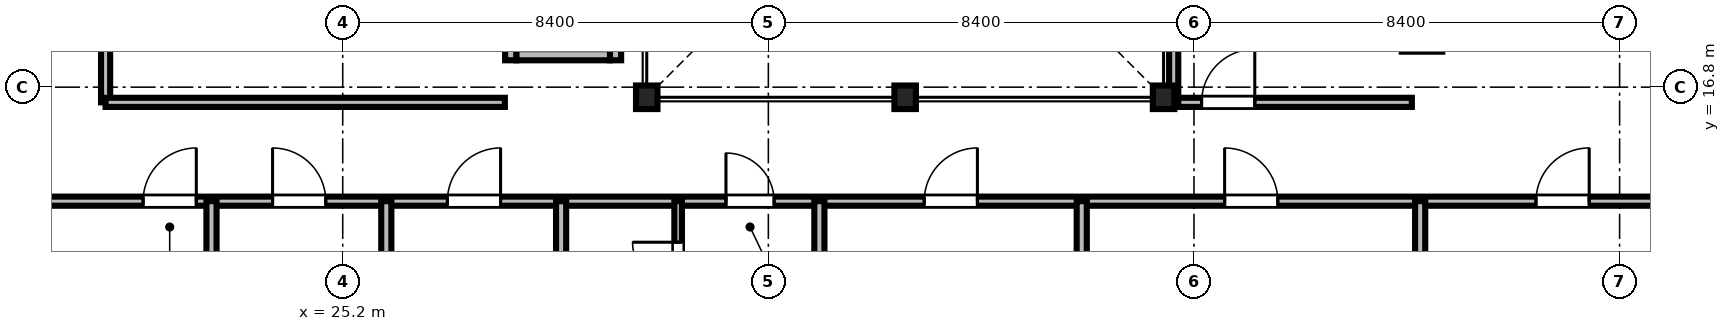
"""IFC4 building model, lengths in metres.
Left out: names, types, materials, properties, quantities, classifications, styles, units other than length and angle.
Written with IfcOpenShell. Run it as: python <this file> out.ifc"""

import sys

from ifc_helpers import new_model, si_unit, direction, frame, frame_2d, origin, origin_2d, place, context, subcontext, project, spatial, rectangle, i_section, extrude, source, transform, mapped, element, fill, save


model = new_model("IFC4")
c1 = context("Model", 3, precision=1e-05, world=origin(), true_north=direction((0.0, 1.0)))
c2 = subcontext(c1, "Body", "Model", "MODEL_VIEW")
j1 = project(units=[si_unit("LENGTHUNIT", "METRE"), si_unit("PLANEANGLEUNIT", "RADIAN")], contexts=[c1])
p1 = place(None, origin())
s1 = spatial("IfcSite", under=j1, at=p1, CompositionType="ELEMENT")
p2 = place(p1, origin())
s2 = spatial("IfcBuilding", under=s1, at=p2, CompositionType="ELEMENT")
p3 = place(p2, frame((0.0, 0.0, 107.5)))
s3 = spatial("IfcBuildingStorey", under=s2, at=p3, CompositionType="ELEMENT", Elevation=107.5)
m1 = source(origin(), c2, "Body", "SweptSolid", [
    extrude(i_section(OverallWidth=0.424, OverallDepth=0.465, WebThickness=0.035, FlangeThickness=0.056, FilletRadius=0.015, at=origin_2d()), origin(), (0.0, 0.0, 1.0), 3.56),
])
for number, where, z_axis, x_axis in (
    (1, (31.2, 16.6, 0.0), (0.0, 0.0, 1.0), (1.0, 0.0, 0.0)),
    (2, (36.3, 16.6, 0.0), (0.0, 0.0, 1.0), (1.0, 0.0, 0.0)),
    (3, (41.4, 16.6, 0.0), (0.0, 0.0, 1.0), (1.0, 0.0, 0.0)),
):
    element("IfcColumn", number, at=place(p3, frame(where, z_axis=z_axis, x_axis=x_axis)), inside=s3, PredefinedType="COLUMN", context=c2, shape_type="MappedRepresentation", body=[
        mapped(m1, transform((0.0, 0.0, 0.0), scale=1.0)),
    ])
m2 = source(origin(), c2, "Body", "SweptSolid", [
    extrude(rectangle(XDim=1.85, YDim=0.22, at=frame_2d((0.925, 0.0))), origin(), (0.0, 0.0, 1.0), 3.56),
])
p4 = place(p3, frame((28.625, 17.44, 0.0), z_axis=(0.0, 0.0, 1.0), x_axis=(1.0, 0.0, 0.0)))
e4 = element("IfcWall", 4, at=p4, inside=s3, PredefinedType="SOLIDWALL", context=c2, shape_type="MappedRepresentation", body=[
    mapped(m2, transform((0.0, 0.0, 0.0), scale=1.0)),
])
m3 = source(origin(), c2, "Body", "SweptSolid", [
    extrude(rectangle(XDim=2.54, YDim=0.22, at=frame_2d((1.27, 0.0))), origin(), (0.0, 0.0, 1.0), 3.56),
])
for number, where, z_axis, x_axis in (
    (5, (28.515, 17.33, 0.0), (0.0, 0.0, 1.0), (0.0, 1.0, 0.0)),
    (6, (30.585, 17.33, 0.0), (0.0, 0.0, 1.0), (0.0, 1.0, 0.0)),
):
    element("IfcWall", number, at=place(p3, frame(where, z_axis=z_axis, x_axis=x_axis)), inside=s3, PredefinedType="SOLIDWALL", context=c2, shape_type="MappedRepresentation", body=[
        mapped(m3, transform((0.0, 0.0, 0.0), scale=1.0)),
    ])
m4 = source(origin(), c2, "Body", "SweptSolid", [
    extrude(rectangle(XDim=46.156, YDim=0.18, at=frame_2d((23.078, 0.0))), origin(), (0.0, 0.0, 1.0), 2.802),
])
p5 = place(p3, frame((6.922, 14.55, 0.0), z_axis=(0.0, 0.0, 1.0), x_axis=(1.0, 0.0, 0.0)))
e7 = element("IfcWall", 7, at=p5, inside=s3, PredefinedType="PARTITIONING", context=c2, shape_type="MappedRepresentation", body=[
    mapped(m4, transform((0.0, 0.0, 0.0), scale=1.0)),
])
m5 = source(origin(), c2, "Body", "SweptSolid", [
    extrude(rectangle(XDim=1.05, YDim=2.2, at=frame_2d((0.525, 1.1))), frame((0.0, 0.1, 0.0), z_axis=(0.0, -1.0, 0.0), x_axis=(1.0, 0.0, 0.0)), (0.0, 0.0, 1.0), 0.2),
])
p6 = place(p5, frame((14.338, 0.0, 0.0)))
e8 = element("IfcOpeningElement", 8, at=p6, cuts=e7, PredefinedType="OPENING", context=c2, shape_type="MappedRepresentation", body=[
    mapped(m5, transform((0.0, 0.0, 0.0), scale=1.0)),
])
p7 = place(p5, frame((16.893, 0.0, 0.0)))
e9 = element("IfcOpeningElement", 9, at=p7, cuts=e7, PredefinedType="OPENING", context=c2, shape_type="MappedRepresentation", body=[
    mapped(m5, transform((0.0, 0.0, 0.0), scale=1.0)),
])
p8 = place(p5, frame((20.344, 0.0, 0.0)))
e10 = element("IfcOpeningElement", 10, at=p8, cuts=e7, PredefinedType="OPENING", context=c2, shape_type="MappedRepresentation", body=[
    mapped(m5, transform((0.0, 0.0, 0.0), scale=1.0)),
])
m6 = source(origin(), c2, "Body", "SweptSolid", [
    extrude(rectangle(XDim=0.95, YDim=2.15, at=frame_2d((0.475, 1.075))), frame((0.0, 0.1, 0.0), z_axis=(0.0, -1.0, 0.0), x_axis=(1.0, 0.0, 0.0)), (0.0, 0.0, 1.0), 0.2),
])
p9 = place(p5, frame((25.842, 0.0, 0.0)))
e11 = element("IfcOpeningElement", 11, at=p9, cuts=e7, PredefinedType="OPENING", context=c2, shape_type="MappedRepresentation", body=[
    mapped(m6, transform((0.0, 0.0, 0.0), scale=1.0)),
])
p10 = place(p5, frame((29.754, 0.0, 0.0)))
e12 = element("IfcOpeningElement", 12, at=p10, cuts=e7, PredefinedType="OPENING", context=c2, shape_type="MappedRepresentation", body=[
    mapped(m5, transform((0.0, 0.0, 0.0), scale=1.0)),
])
p11 = place(p5, frame((35.683, 0.0, 0.0)))
e13 = element("IfcOpeningElement", 13, at=p11, cuts=e7, PredefinedType="OPENING", context=c2, shape_type="MappedRepresentation", body=[
    mapped(m5, transform((0.0, 0.0, 0.0), scale=1.0)),
])
p12 = place(p5, frame((41.828, 0.0, 0.0)))
e14 = element("IfcOpeningElement", 14, at=p12, cuts=e7, PredefinedType="OPENING", context=c2, shape_type="MappedRepresentation", body=[
    mapped(m5, transform((0.0, 0.0, 0.0), scale=1.0)),
])
m7 = source(origin(), c2, "Body", "SweptSolid", [
    extrude(rectangle(XDim=11.94, YDim=0.18, at=frame_2d((5.97, 0.0))), origin(), (0.0, 0.0, 1.0), 2.952),
])
p13 = place(p3, frame((20.52, 16.5, 0.0), z_axis=(0.0, 0.0, 1.0), x_axis=(0.0, 1.0, 0.0)))
e15 = element("IfcWall", 15, at=p13, inside=s3, PredefinedType="PARTITIONING", context=c2, shape_type="MappedRepresentation", body=[
    mapped(m7, transform((0.0, 0.0, 0.0), scale=1.0)),
])
p14 = place(p13, frame((4.5, 0.0, 0.0)))
e16 = element("IfcOpeningElement", 16, at=p14, cuts=e15, PredefinedType="OPENING", context=c2, shape_type="MappedRepresentation", body=[
    mapped(m5, transform((0.0, 0.0, 0.0), scale=1.0)),
])
m8 = source(origin(), c2, "Body", "SweptSolid", [
    extrude(rectangle(XDim=4.7, YDim=0.18, at=frame_2d((2.35, 0.0))), origin(), (0.0, 0.0, 1.0), 2.952),
])
p15 = place(p3, frame((41.6, 16.5, 0.0), z_axis=(0.0, 0.0, 1.0), x_axis=(1.0, 0.0, 0.0)))
e17 = element("IfcWall", 17, at=p15, inside=s3, PredefinedType="PARTITIONING", context=c2, shape_type="MappedRepresentation", body=[
    mapped(m8, transform((0.0, 0.0, 0.0), scale=1.0)),
])
p16 = place(p15, frame((0.55, 0.0, 0.0)))
e18 = element("IfcOpeningElement", 18, at=p16, cuts=e17, PredefinedType="OPENING", context=c2, shape_type="MappedRepresentation", body=[
    mapped(m5, transform((0.0, 0.0, 0.0), scale=1.0)),
])
m9 = source(origin(), c2, "Body", "SweptSolid", [
    extrude(rectangle(XDim=2.36, YDim=0.15, at=frame_2d((1.18, 0.0))), origin(), (0.0, 0.0, 1.0), 3.56),
])
p17 = place(p3, frame((31.82, 12.19, 0.0), z_axis=(0.0, 0.0, 1.0), x_axis=(0.0, 1.0, 0.0)))
e19 = element("IfcWall", 19, at=p17, inside=s3, PredefinedType="PARTITIONING", context=c2, shape_type="MappedRepresentation", body=[
    mapped(m9, transform((0.0, 0.0, 0.0), scale=1.0)),
])
m10 = source(origin(), c2, "Body", "SweptSolid", [
    extrude(rectangle(XDim=0.9, YDim=2.1, at=frame_2d((0.45, 1.05))), frame((0.0, 0.085, 0.0), z_axis=(0.0, -1.0, 0.0), x_axis=(1.0, 0.0, 0.0)), (0.0, 0.0, 1.0), 0.17),
])
p18 = place(p17, frame((0.65, 0.0, 0.0)))
e20 = element("IfcOpeningElement", 20, at=p18, cuts=e19, PredefinedType="OPENING", context=c2, shape_type="MappedRepresentation", body=[
    mapped(m10, transform((0.0, 0.0, 0.0), scale=1.0)),
])
m11 = source(origin(), c2, "Body", "SweptSolid", [
    extrude(rectangle(XDim=12.428, YDim=0.2, at=frame_2d((6.214, 0.0))), origin(), (0.0, 0.0, 1.0), 2.802),
])
for number, where, z_axis, x_axis in (
    (21, (22.61, 2.122, 0.0), (0.0, 0.0, 1.0), (0.0, 1.0, 0.0)),
    (22, (26.06, 2.122, 0.0), (0.0, 0.0, 1.0), (0.0, 1.0, 0.0)),
):
    element("IfcWall", number, at=place(p3, frame(where, z_axis=z_axis, x_axis=x_axis)), inside=s3, PredefinedType="PARTITIONING", context=c2, shape_type="MappedRepresentation", body=[
        mapped(m11, transform((0.0, 0.0, 0.0), scale=1.0)),
    ])
m12 = source(origin(), c2, "Body", "SweptSolid", [
    extrude(rectangle(XDim=12.62, YDim=0.2, at=frame_2d((6.31, 0.0))), origin(), (0.0, 0.0, 1.0), 2.802),
])
p19 = place(p3, frame((29.51, 1.93, 0.0), z_axis=(0.0, 0.0, 1.0), x_axis=(0.0, 1.0, 0.0)))
e23 = element("IfcWall", 23, at=p19, inside=s3, PredefinedType="PARTITIONING", context=c2, shape_type="MappedRepresentation", body=[
    mapped(m12, transform((0.0, 0.0, 0.0), scale=1.0)),
])
for number, where, z_axis, x_axis in (
    (24, (34.607, 2.122, 0.0), (0.0, 0.0, 1.0), (0.0, 1.0, 0.0)),
    (25, (39.785, 2.122, 0.0), (0.0, 0.0, 1.0), (0.0, 1.0, 0.0)),
    (26, (46.464, 2.122, 0.0), (0.0, 0.0, 1.0), (0.0, 1.0, 0.0)),
):
    element("IfcWall", number, at=place(p3, frame(where, z_axis=z_axis, x_axis=x_axis)), inside=s3, PredefinedType="PARTITIONING", context=c2, shape_type="MappedRepresentation", body=[
        mapped(m11, transform((0.0, 0.0, 0.0), scale=1.0)),
    ])
m13 = source(origin(), c2, "Body", "SweptSolid", [
    extrude(rectangle(XDim=7.88, YDim=0.18, at=frame_2d((3.94, 0.0))), origin(), (0.0, 0.0, 1.0), 3.56),
])
p20 = place(p3, frame((20.52, 16.5, 0.0), z_axis=(0.0, 0.0, 1.0), x_axis=(1.0, 0.0, 0.0)))
e27 = element("IfcWall", 27, at=p20, inside=s3, PredefinedType="PARTITIONING", context=c2, shape_type="MappedRepresentation", body=[
    mapped(m13, transform((0.0, 0.0, 0.0), scale=1.0)),
])
m14 = source(origin(), c2, "Body", "SweptSolid", [
    extrude(rectangle(XDim=7.15, YDim=0.18, at=frame_2d((3.575, 0.0))), origin(), (0.0, 0.0, 1.0), 2.952),
])
p21 = place(p3, frame((41.6, 16.5, 0.0), z_axis=(0.0, 0.0, 1.0), x_axis=(0.0, 1.0, 0.0)))
e28 = element("IfcWall", 28, at=p21, inside=s3, PredefinedType="PARTITIONING", context=c2, shape_type="MappedRepresentation", body=[
    mapped(m14, transform((0.0, 0.0, 0.0), scale=1.0)),
])
m15 = source(origin(), c2, "Body", "SweptSolid", [
    extrude(rectangle(XDim=1.05, YDim=2.2, at=frame_2d((0.525, 1.1))), frame((0.0, 0.025, 0.0), z_axis=(0.0, -1.0, 0.0), x_axis=(1.0, 0.0, 0.0)), (0.0, 0.0, 1.0), 0.05),
])
p22 = place(p6, origin())
e29 = element("IfcDoor", 29, at=p22, inside=s3, OperationType="SINGLE_SWING_RIGHT", PredefinedType="DOOR", context=c2, shape_type="MappedRepresentation", body=[
    mapped(m15, transform((0.0, 0.0, 0.0), scale=1.0)),
])
fill(e8, e29)
p23 = place(p7, origin())
e30 = element("IfcDoor", 30, at=p23, inside=s3, OperationType="SINGLE_SWING_LEFT", PredefinedType="DOOR", context=c2, shape_type="MappedRepresentation", body=[
    mapped(m15, transform((0.0, 0.0, 0.0), scale=1.0)),
])
fill(e9, e30)
p24 = place(p8, origin())
e31 = element("IfcDoor", 31, at=p24, inside=s3, OperationType="SINGLE_SWING_RIGHT", PredefinedType="DOOR", context=c2, shape_type="MappedRepresentation", body=[
    mapped(m15, transform((0.0, 0.0, 0.0), scale=1.0)),
])
fill(e10, e31)
m16 = source(origin(), c2, "Body", "SweptSolid", [
    extrude(rectangle(XDim=0.95, YDim=2.15, at=frame_2d((0.475, 1.075))), frame((0.0, 0.025, 0.0), z_axis=(0.0, -1.0, 0.0), x_axis=(1.0, 0.0, 0.0)), (0.0, 0.0, 1.0), 0.05),
])
p25 = place(p9, origin())
e32 = element("IfcDoor", 32, at=p25, inside=s3, OperationType="SINGLE_SWING_LEFT", PredefinedType="DOOR", context=c2, shape_type="MappedRepresentation", body=[
    mapped(m16, transform((0.0, 0.0, 0.0), scale=1.0)),
])
fill(e11, e32)
p26 = place(p10, origin())
e33 = element("IfcDoor", 33, at=p26, inside=s3, OperationType="SINGLE_SWING_RIGHT", PredefinedType="DOOR", context=c2, shape_type="MappedRepresentation", body=[
    mapped(m15, transform((0.0, 0.0, 0.0), scale=1.0)),
])
fill(e12, e33)
p27 = place(p11, origin())
e34 = element("IfcDoor", 34, at=p27, inside=s3, OperationType="SINGLE_SWING_LEFT", PredefinedType="DOOR", context=c2, shape_type="MappedRepresentation", body=[
    mapped(m15, transform((0.0, 0.0, 0.0), scale=1.0)),
])
fill(e13, e34)
p28 = place(p12, origin())
e35 = element("IfcDoor", 35, at=p28, inside=s3, OperationType="SINGLE_SWING_RIGHT", PredefinedType="DOOR", context=c2, shape_type="MappedRepresentation", body=[
    mapped(m15, transform((0.0, 0.0, 0.0), scale=1.0)),
])
fill(e14, e35)
p29 = place(p16, origin())
e36 = element("IfcDoor", 36, at=p29, inside=s3, OperationType="SINGLE_SWING_RIGHT", PredefinedType="DOOR", context=c2, shape_type="MappedRepresentation", body=[
    mapped(m15, transform((0.0, 0.0, 0.0), scale=1.0)),
])
fill(e18, e36)
m17 = source(origin(), c2, "Body", "SweptSolid", [
    extrude(rectangle(XDim=0.9, YDim=2.1, at=frame_2d((0.45, 1.05))), frame((0.0, 0.025, 0.0), z_axis=(0.0, -1.0, 0.0), x_axis=(1.0, 0.0, 0.0)), (0.0, 0.0, 1.0), 0.05),
])
p30 = place(p18, origin())
e37 = element("IfcDoor", 37, at=p30, inside=s3, OperationType="SINGLE_SWING_RIGHT", PredefinedType="DOOR", context=c2, shape_type="MappedRepresentation", body=[
    mapped(m17, transform((0.0, 0.0, 0.0), scale=1.0)),
])
fill(e20, e37)
save(model, sys.argv[1])
